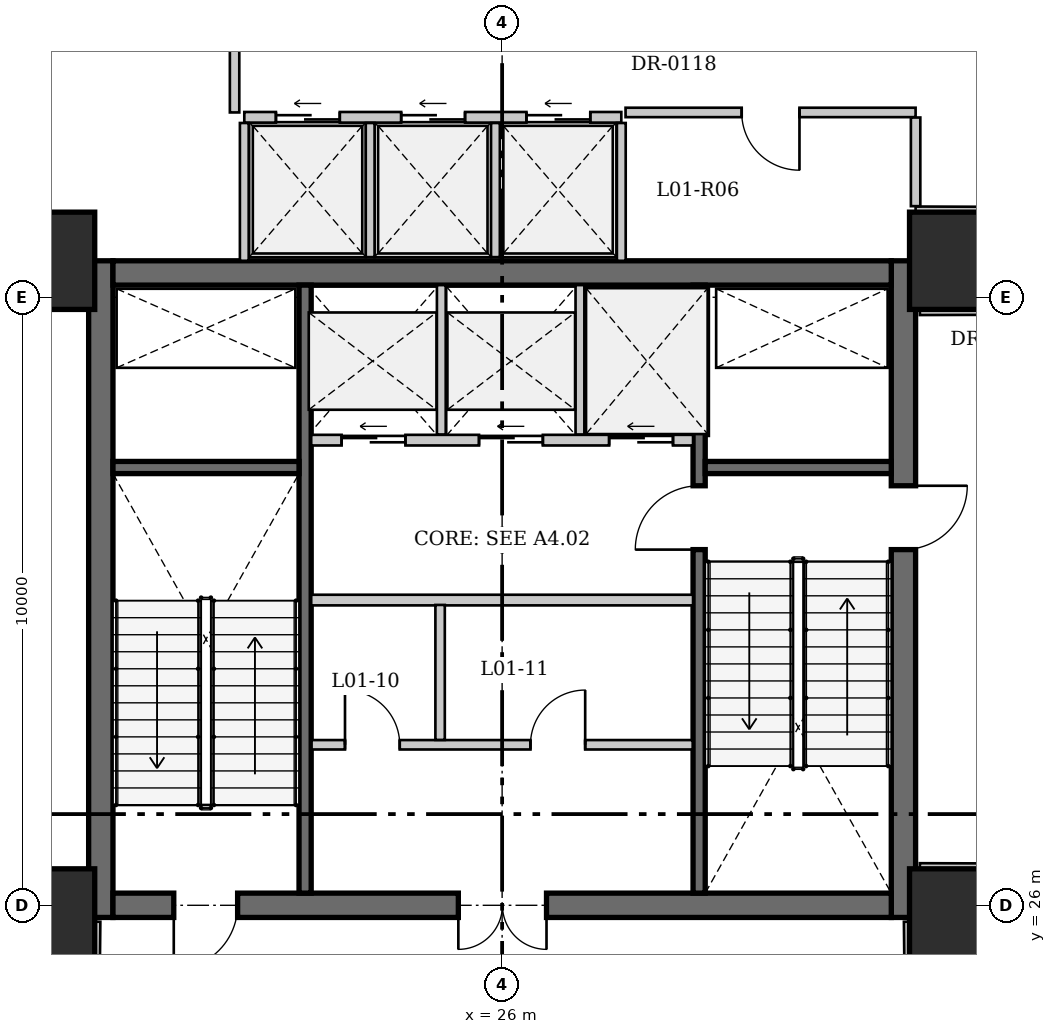
"""IFC4 building model, lengths in metres.
Left out: names, types, materials, properties, quantities, classifications, styles, units other than length and angle.
Written with IfcOpenShell. Run it as: python <this file> out.ifc"""

import sys

from ifc_helpers import new_model, si_unit, direction, frame, frame_2d, origin, origin_2d, place, context, subcontext, project, spatial, rectangle, extrude, source, transform, mapped, element, fill, save


model = new_model("IFC4")
c1 = context("Model", 3, precision=1e-05, world=origin(), true_north=direction((0.0, 1.0)))
c2 = subcontext(c1, "Body", "Model", "MODEL_VIEW")
j1 = project(units=[si_unit("LENGTHUNIT", "METRE"), si_unit("PLANEANGLEUNIT", "RADIAN")], contexts=[c1])
p1 = place(None, origin())
s1 = spatial("IfcSite", under=j1, at=p1, CompositionType="ELEMENT")
p2 = place(p1, origin())
s2 = spatial("IfcBuilding", under=s1, at=p2, CompositionType="ELEMENT")
p3 = place(p2, frame((0.0, 0.0, 5.2)))
s3 = spatial("IfcBuildingStorey", under=s2, at=p3, CompositionType="ELEMENT", Elevation=5.2)
for number, where, z_axis, x_axis in (
    (1, (18.5, 25.8, 0.0), (0.0, 0.0, 1.0), (1.0, 0.0, 0.0)),
    (2, (18.5, 36.6, 0.0), (0.0, 0.0, 1.0), (1.0, 0.0, 0.0)),
    (3, (33.5, 25.8, 0.0), (0.0, 0.0, 1.0), (1.0, 0.0, 0.0)),
    (4, (33.5, 36.6, 0.0), (0.0, 0.0, 1.0), (1.0, 0.0, 0.0)),
):
    element("IfcColumn", number, at=place(p3, frame(where, z_axis=z_axis, x_axis=x_axis)), inside=s3, PredefinedType="COLUMN", context=c2, shape_type="SweptSolid", body=[
        extrude(rectangle(XDim=1.6, YDim=1.6, at=origin_2d()), origin(), (0.0, 0.0, 1.0), 4.3),
    ])
p4 = place(p3, frame((19.4, 25.8, 0.0), z_axis=(0.0, 0.0, 1.0), x_axis=(0.0, 1.0, 0.0)))
e5 = element("IfcWall", 5, at=p4, inside=s3, PredefinedType="SHEAR", context=c2, shape_type="SweptSolid", body=[
    extrude(rectangle(XDim=10.8, YDim=0.4, at=frame_2d((5.4, 0.0))), origin(), (0.0, 0.0, 1.0), 4.6),
])
p5 = place(p3, frame((32.6, 36.6, 0.0), z_axis=(0.0, 0.0, 1.0), x_axis=(0.0, -1.0, 0.0)))
e6 = element("IfcWall", 6, at=p5, inside=s3, PredefinedType="SHEAR", context=c2, shape_type="SweptSolid", body=[
    extrude(rectangle(XDim=10.8, YDim=0.4, at=frame_2d((5.4, 0.0))), origin(), (0.0, 0.0, 1.0), 4.6),
])
p6 = place(p5, frame((3.7, 0.0, 0.0)))
e7 = element("IfcOpeningElement", 7, at=p6, cuts=e6, PredefinedType="OPENING", context=c2, shape_type="SweptSolid", body=[
    extrude(rectangle(XDim=1.05, YDim=2.15, at=frame_2d((0.525, 1.075))), frame((0.0, 0.21, 0.0), z_axis=(0.0, -1.0, 0.0), x_axis=(1.0, 0.0, 0.0)), (0.0, 0.0, 1.0), 0.42),
])
p7 = place(p3, frame((19.6, 36.4, 0.0), z_axis=(0.0, 0.0, 1.0), x_axis=(1.0, 0.0, 0.0)))
e8 = element("IfcWall", 8, at=p7, inside=s3, PredefinedType="SHEAR", context=c2, shape_type="SweptSolid", body=[
    extrude(rectangle(XDim=12.8, YDim=0.4, at=frame_2d((6.4, 0.0))), origin(), (0.0, 0.0, 1.0), 4.6),
])
p8 = place(p3, frame((32.4, 26.0, 0.0), z_axis=(0.0, 0.0, 1.0), x_axis=(-1.0, 0.0, 0.0)))
e9 = element("IfcWall", 9, at=p8, inside=s3, PredefinedType="SHEAR", context=c2, shape_type="SweptSolid", body=[
    extrude(rectangle(XDim=12.8, YDim=0.4, at=frame_2d((6.4, 0.0))), origin(), (0.0, 0.0, 1.0), 4.6),
])
p9 = place(p8, frame((10.75, 0.0, 0.0)))
e10 = element("IfcOpeningElement", 10, at=p9, cuts=e9, PredefinedType="OPENING", context=c2, shape_type="SweptSolid", body=[
    extrude(rectangle(XDim=1.05, YDim=2.15, at=frame_2d((0.525, 1.075))), frame((0.0, 0.21, 0.0), z_axis=(0.0, -1.0, 0.0), x_axis=(1.0, 0.0, 0.0)), (0.0, 0.0, 1.0), 0.42),
])
p10 = place(p8, frame((5.67, 0.0, 0.0)))
e11 = element("IfcOpeningElement", 11, at=p10, cuts=e9, PredefinedType="OPENING", context=c2, shape_type="SweptSolid", body=[
    extrude(rectangle(XDim=1.45, YDim=2.2, at=frame_2d((0.725, 1.1))), frame((0.0, 0.21, 0.0), z_axis=(0.0, -1.0, 0.0), x_axis=(1.0, 0.0, 0.0)), (0.0, 0.0, 1.0), 0.42),
])
p11 = place(p3, frame((22.76, 26.2, 0.0), z_axis=(0.0, 0.0, 1.0), x_axis=(0.0, 1.0, 0.0)))
e12 = element("IfcWall", 12, at=p11, inside=s3, PredefinedType="SHEAR", context=c2, shape_type="SweptSolid", body=[
    extrude(rectangle(XDim=10.0, YDim=0.2, at=frame_2d((5.0, 0.0))), origin(), (0.0, 0.0, 1.0), 4.6),
])
p12 = place(p3, frame((29.24, 26.2, 0.0), z_axis=(0.0, 0.0, 1.0), x_axis=(0.0, 1.0, 0.0)))
e13 = element("IfcWall", 13, at=p12, inside=s3, PredefinedType="SHEAR", context=c2, shape_type="SweptSolid", body=[
    extrude(rectangle(XDim=10.0, YDim=0.2, at=frame_2d((5.0, 0.0))), origin(), (0.0, 0.0, 1.0), 4.6),
])
p13 = place(p12, frame((5.65, 0.0, 0.0)))
e14 = element("IfcOpeningElement", 14, at=p13, cuts=e13, PredefinedType="OPENING", context=c2, shape_type="SweptSolid", body=[
    extrude(rectangle(XDim=1.05, YDim=2.15, at=frame_2d((0.525, 1.075))), frame((0.0, 0.11, 0.0), z_axis=(0.0, -1.0, 0.0), x_axis=(1.0, 0.0, 0.0)), (0.0, 0.0, 1.0), 0.22),
])
for number, where, z_axis, x_axis in (
    (15, (19.6, 33.2, 0.0), (0.0, 0.0, 1.0), (1.0, 0.0, 0.0)),
    (16, (29.34, 33.2, 0.0), (0.0, 0.0, 1.0), (1.0, 0.0, 0.0)),
):
    element("IfcWall", number, at=place(p3, frame(where, z_axis=z_axis, x_axis=x_axis)), inside=s3, PredefinedType="SHEAR", context=c2, shape_type="SweptSolid", body=[
        extrude(rectangle(XDim=3.06, YDim=0.2, at=frame_2d((1.53, 0.0))), origin(), (0.0, 0.0, 1.0), 4.6),
    ])
p14 = place(p3, frame((22.86, 33.65, 0.0), z_axis=(0.0, 0.0, 1.0), x_axis=(1.0, 0.0, 0.0)))
e17 = element("IfcWall", 17, at=p14, inside=s3, PredefinedType="SOLIDWALL", context=c2, shape_type="SweptSolid", body=[
    extrude(rectangle(XDim=6.28, YDim=0.175, at=frame_2d((3.14, 0.0))), origin(), (0.0, 0.0, 1.0), 4.3),
])
p15 = place(p14, frame((0.5, 0.0, 0.0)))
e18 = element("IfcOpeningElement", 18, at=p15, cuts=e17, PredefinedType="OPENING", context=c2, shape_type="SweptSolid", body=[
    extrude(rectangle(XDim=1.05, YDim=2.15, at=frame_2d((0.525, 1.075))), frame((0.0, 0.098, 0.0), z_axis=(0.0, -1.0, 0.0), x_axis=(1.0, 0.0, 0.0)), (0.0, 0.0, 1.0), 0.195),
])
p16 = place(p14, frame((2.76, 0.0, 0.0)))
e19 = element("IfcOpeningElement", 19, at=p16, cuts=e17, PredefinedType="OPENING", context=c2, shape_type="SweptSolid", body=[
    extrude(rectangle(XDim=1.05, YDim=2.15, at=frame_2d((0.525, 1.075))), frame((0.0, 0.098, 0.0), z_axis=(0.0, -1.0, 0.0), x_axis=(1.0, 0.0, 0.0)), (0.0, 0.0, 1.0), 0.195),
])
p17 = place(p14, frame((4.9, 0.0, 0.0)))
e20 = element("IfcOpeningElement", 20, at=p17, cuts=e17, PredefinedType="OPENING", context=c2, shape_type="SweptSolid", body=[
    extrude(rectangle(XDim=1.05, YDim=2.15, at=frame_2d((0.525, 1.075))), frame((0.0, 0.098, 0.0), z_axis=(0.0, -1.0, 0.0), x_axis=(1.0, 0.0, 0.0)), (0.0, 0.0, 1.0), 0.195),
])
for number, where, z_axis, x_axis in (
    (21, (25.0, 33.743, 0.0), (0.0, 0.0, 1.0), (0.0, 1.0, 0.0)),
    (22, (27.28, 33.743, 0.0), (0.0, 0.0, 1.0), (0.0, 1.0, 0.0)),
):
    element("IfcWall", number, at=place(p3, frame(where, z_axis=z_axis, x_axis=x_axis)), inside=s3, PredefinedType="SOLIDWALL", context=c2, shape_type="SweptSolid", body=[
        extrude(rectangle(XDim=2.457, YDim=0.145, at=frame_2d((1.228, 0.0))), origin(), (0.0, 0.0, 1.0), 4.3),
    ])
p18 = place(p3, frame((22.86, 31.02, 0.0), z_axis=(0.0, 0.0, 1.0), x_axis=(1.0, 0.0, 0.0)))
e23 = element("IfcWall", 23, at=p18, inside=s3, PredefinedType="SOLIDWALL", context=c2, shape_type="SweptSolid", body=[
    extrude(rectangle(XDim=6.28, YDim=0.175, at=frame_2d((3.14, 0.0))), origin(), (0.0, 0.0, 1.0), 4.3),
])
p19 = place(p3, frame((22.866, 28.64, 0.0), z_axis=(0.0, 0.0, 1.0), x_axis=(1.0, 0.0, 0.0)))
e24 = element("IfcWall", 24, at=p19, inside=s3, PredefinedType="PARTITIONING", context=c2, shape_type="SweptSolid", body=[
    extrude(rectangle(XDim=6.268, YDim=0.155, at=frame_2d((3.134, 0.0))), origin(), (0.0, 0.0, 1.0), 4.3),
])
p20 = place(p19, frame((0.55, 0.0, 0.0)))
e25 = element("IfcOpeningElement", 25, at=p20, cuts=e24, PredefinedType="OPENING", context=c2, shape_type="SweptSolid", body=[
    extrude(rectangle(XDim=0.9, YDim=2.1, at=frame_2d((0.45, 1.05))), frame((0.0, 0.087, 0.0), z_axis=(0.0, -1.0, 0.0), x_axis=(1.0, 0.0, 0.0)), (0.0, 0.0, 1.0), 0.175),
])
p21 = place(p19, frame((3.6, 0.0, 0.0)))
e26 = element("IfcOpeningElement", 26, at=p21, cuts=e24, PredefinedType="OPENING", context=c2, shape_type="SweptSolid", body=[
    extrude(rectangle(XDim=0.9, YDim=2.1, at=frame_2d((0.45, 1.05))), frame((0.0, 0.087, 0.0), z_axis=(0.0, -1.0, 0.0), x_axis=(1.0, 0.0, 0.0)), (0.0, 0.0, 1.0), 0.175),
])
p22 = place(p3, frame((24.98, 28.72, 0.0), z_axis=(0.0, 0.0, 1.0), x_axis=(0.0, 1.0, 0.0)))
e27 = element("IfcWall", 27, at=p22, inside=s3, PredefinedType="PARTITIONING", context=c2, shape_type="SweptSolid", body=[
    extrude(rectangle(XDim=2.22, YDim=0.155, at=frame_2d((1.11, 0.0))), origin(), (0.0, 0.0, 1.0), 4.3),
])
p23 = place(p3, frame((21.76, 38.96, 0.0), z_axis=(0.0, 0.0, 1.0), x_axis=(1.0, 0.0, 0.0)))
e28 = element("IfcWall", 28, at=p23, inside=s3, PredefinedType="SOLIDWALL", context=c2, shape_type="SweptSolid", body=[
    extrude(rectangle(XDim=6.2, YDim=0.175, at=frame_2d((3.1, 0.0))), origin(), (0.0, 0.0, 1.0), 4.3),
])
p24 = place(p23, frame((0.52, 0.0, 0.0)))
e29 = element("IfcOpeningElement", 29, at=p24, cuts=e28, PredefinedType="OPENING", context=c2, shape_type="SweptSolid", body=[
    extrude(rectangle(XDim=1.05, YDim=2.15, at=frame_2d((0.525, 1.075))), frame((0.0, 0.098, 0.0), z_axis=(0.0, -1.0, 0.0), x_axis=(1.0, 0.0, 0.0)), (0.0, 0.0, 1.0), 0.195),
])
p25 = place(p23, frame((2.58, 0.0, 0.0)))
e30 = element("IfcOpeningElement", 30, at=p25, cuts=e28, PredefinedType="OPENING", context=c2, shape_type="SweptSolid", body=[
    extrude(rectangle(XDim=1.05, YDim=2.15, at=frame_2d((0.525, 1.075))), frame((0.0, 0.098, 0.0), z_axis=(0.0, -1.0, 0.0), x_axis=(1.0, 0.0, 0.0)), (0.0, 0.0, 1.0), 0.195),
])
p26 = place(p23, frame((4.64, 0.0, 0.0)))
e31 = element("IfcOpeningElement", 31, at=p26, cuts=e28, PredefinedType="OPENING", context=c2, shape_type="SweptSolid", body=[
    extrude(rectangle(XDim=1.05, YDim=2.15, at=frame_2d((0.525, 1.075))), frame((0.0, 0.098, 0.0), z_axis=(0.0, -1.0, 0.0), x_axis=(1.0, 0.0, 0.0)), (0.0, 0.0, 1.0), 0.195),
])
for number, where, z_axis, x_axis in (
    (32, (21.76, 36.6, 0.0), (0.0, 0.0, 1.0), (0.0, 1.0, 0.0)),
    (33, (27.96, 36.6, 0.0), (0.0, 0.0, 1.0), (0.0, 1.0, 0.0)),
):
    element("IfcWall", number, at=place(p3, frame(where, z_axis=z_axis, x_axis=x_axis)), inside=s3, PredefinedType="SOLIDWALL", context=c2, shape_type="SweptSolid", body=[
        extrude(rectangle(XDim=2.266, YDim=0.145, at=frame_2d((1.133, 0.0))), origin(), (0.0, 0.0, 1.0), 4.3),
    ])
for number, where, z_axis, x_axis in (
    (34, (23.83, 36.66, 0.0), (0.0, 0.0, 1.0), (0.0, 1.0, 0.0)),
    (35, (25.89, 36.66, 0.0), (0.0, 0.0, 1.0), (0.0, 1.0, 0.0)),
):
    element("IfcWall", number, at=place(p3, frame(where, z_axis=z_axis, x_axis=x_axis)), inside=s3, PredefinedType="SOLIDWALL", context=c2, shape_type="SweptSolid", body=[
        extrude(rectangle(XDim=2.207, YDim=0.145, at=frame_2d((1.103, 0.0))), origin(), (0.0, 0.0, 1.0), 4.3),
    ])
p27 = place(p3, frame((32.8, 39.04, 0.0), z_axis=(0.0, 0.0, 1.0), x_axis=(-1.0, 0.0, 0.0)))
e36 = element("IfcWall", 36, at=p27, inside=s3, PredefinedType="PARTITIONING", context=c2, shape_type="SweptSolid", body=[
    extrude(rectangle(XDim=4.77, YDim=0.155, at=frame_2d((2.385, 0.0))), origin(), (0.0, 0.0, 1.0), 4.3),
])
p28 = place(p27, frame((1.91, 0.0, 0.0)))
e37 = element("IfcOpeningElement", 37, at=p28, cuts=e36, PredefinedType="OPENING", context=c2, shape_type="SweptSolid", body=[
    extrude(rectangle(XDim=0.95, YDim=2.15, at=frame_2d((0.475, 1.075))), frame((0.0, 0.087, 0.0), z_axis=(0.0, -1.0, 0.0), x_axis=(1.0, 0.0, 0.0)), (0.0, 0.0, 1.0), 0.175),
])
p29 = place(p3, frame((19.308, 25.07, 0.0), z_axis=(0.0, 0.0, 1.0), x_axis=(0.010362137944, 0.999946311607, 0.0)))
e38 = element("IfcWall", 38, at=p29, inside=s3, PredefinedType="PARTITIONING", context=c2, shape_type="SweptSolid", body=[
    extrude(rectangle(XDim=0.66, YDim=0.155, at=frame_2d((0.33, 0.0))), origin(), (0.0, 0.0, 1.0), 4.3),
])
p30 = place(p3, frame((32.685, 25.73, 0.0), z_axis=(0.0, 0.0, 1.0), x_axis=(0.010511902743, -0.999944748424, 0.0)))
e39 = element("IfcWall", 39, at=p30, inside=s3, PredefinedType="PARTITIONING", context=c2, shape_type="SweptSolid", body=[
    extrude(rectangle(XDim=0.743, YDim=0.155, at=frame_2d((0.372, 0.0))), origin(), (0.0, 0.0, 1.0), 4.3),
])
p31 = place(p3, frame((34.227, 26.611, 0.0), z_axis=(0.0, 0.0, 1.0), x_axis=(-0.999995856473, 0.002878721429, 0.0)))
e40 = element("IfcWall", 40, at=p31, inside=s3, PredefinedType="PARTITIONING", context=c2, shape_type="SweptSolid", body=[
    extrude(rectangle(XDim=1.357, YDim=0.155, at=frame_2d((0.678, 0.0))), origin(), (0.0, 0.0, 1.0), 4.3),
])
p32 = place(p3, frame((32.87, 35.785, 0.0), z_axis=(0.0, 0.0, 1.0), x_axis=(0.99999584892, 0.002881343971, 0.0)))
e41 = element("IfcWall", 41, at=p32, inside=s3, PredefinedType="PARTITIONING", context=c2, shape_type="SweptSolid", body=[
    extrude(rectangle(XDim=1.44, YDim=0.155, at=frame_2d((0.72, 0.0))), origin(), (0.0, 0.0, 1.0), 4.3),
])
p33 = place(p3, frame((34.228, 37.41, 0.0), z_axis=(0.0, 0.0, 1.0), x_axis=(-0.999993554729, 0.003590334185, 0.0)))
e42 = element("IfcWall", 42, at=p33, inside=s3, PredefinedType="PARTITIONING", context=c2, shape_type="SweptSolid", body=[
    extrude(rectangle(XDim=1.428, YDim=0.155, at=frame_2d((0.714, 0.0))), origin(), (0.0, 0.0, 1.0), 4.3),
])
p34 = place(p3, frame((32.8, 37.499, 0.0), z_axis=(0.0, 0.0, 1.0), x_axis=(0.0, 1.0, 0.0)))
e43 = element("IfcWall", 43, at=p34, inside=s3, PredefinedType="PARTITIONING", context=c2, shape_type="SweptSolid", body=[
    extrude(rectangle(XDim=1.458, YDim=0.155, at=frame_2d((0.729, 0.0))), origin(), (0.0, 0.0, 1.0), 4.3),
])
p35 = place(p3, frame((21.6, 39.04, 0.0), z_axis=(0.0, 0.0, 1.0), x_axis=(0.0, 1.0, 0.0)))
e44 = element("IfcWall", 44, at=p35, inside=s3, PredefinedType="PARTITIONING", context=c2, shape_type="SweptSolid", body=[
    extrude(rectangle(XDim=1.876, YDim=0.155, at=frame_2d((0.938, 0.0))), origin(), (0.0, 0.0, 1.0), 4.3),
])
m1 = source(origin(), c2, "Body", "SweptSolid", [
    extrude(rectangle(XDim=1.05, YDim=2.15, at=frame_2d((0.525, 1.075))), frame((0.0, 0.025, 0.0), z_axis=(0.0, -1.0, 0.0), x_axis=(1.0, 0.0, 0.0)), (0.0, 0.0, 1.0), 0.05),
])
p36 = place(p9, origin())
e45 = element("IfcDoor", 45, at=p36, inside=s3, OperationType="SINGLE_SWING_RIGHT", PredefinedType="DOOR", context=c2, shape_type="MappedRepresentation", body=[
    mapped(m1, transform((0.0, 0.0, 0.0), x_axis=(1.0, 0.0, 0.0), y_axis=(0.0, 1.0, 0.0), z_axis=(0.0, 0.0, 1.0), scale=1.0)),
])
fill(e10, e45)
m2 = source(origin(), c2, "Body", "SweptSolid", [
    extrude(rectangle(XDim=1.45, YDim=2.2, at=frame_2d((0.725, 1.1))), frame((0.0, 0.025, 0.0), z_axis=(0.0, -1.0, 0.0), x_axis=(1.0, 0.0, 0.0)), (0.0, 0.0, 1.0), 0.05),
])
p37 = place(p10, origin())
e46 = element("IfcDoor", 46, at=p37, inside=s3, OperationType="DOUBLE_DOOR_SINGLE_SWING", PredefinedType="DOOR", context=c2, shape_type="MappedRepresentation", body=[
    mapped(m2, transform((0.0, 0.0, 0.0), x_axis=(1.0, 0.0, 0.0), y_axis=(0.0, 1.0, 0.0), z_axis=(0.0, 0.0, 1.0), scale=1.0)),
])
fill(e11, e46)
p38 = place(p6, origin())
e47 = element("IfcDoor", 47, at=p38, inside=s3, OperationType="SINGLE_SWING_LEFT", PredefinedType="DOOR", context=c2, shape_type="MappedRepresentation", body=[
    mapped(m1, transform((0.0, 0.0, 0.0), x_axis=(1.0, 0.0, 0.0), y_axis=(0.0, 1.0, 0.0), z_axis=(0.0, 0.0, 1.0), scale=1.0)),
])
fill(e7, e47)
p39 = place(p13, origin())
e48 = element("IfcDoor", 48, at=p39, inside=s3, OperationType="SINGLE_SWING_LEFT", PredefinedType="DOOR", context=c2, shape_type="MappedRepresentation", body=[
    mapped(m1, transform((0.0, 0.0, 0.0), x_axis=(1.0, 0.0, 0.0), y_axis=(0.0, 1.0, 0.0), z_axis=(0.0, 0.0, 1.0), scale=1.0)),
])
fill(e14, e48)
m3 = source(origin(), c2, "Body", "SweptSolid", [
    extrude(rectangle(XDim=1.05, YDim=2.15, at=frame_2d((0.525, 1.075))), frame((0.0, 0.025, 0.0), z_axis=(0.0, -1.0, 0.0), x_axis=(1.0, 0.0, 0.0)), (0.0, 0.0, 1.0), 0.05),
])
p40 = place(p15, origin())
e49 = element("IfcDoor", 49, at=p40, inside=s3, OperationType="SLIDING_TO_LEFT", PredefinedType="DOOR", context=c2, shape_type="MappedRepresentation", body=[
    mapped(m3, transform((0.0, 0.0, 0.0), x_axis=(1.0, 0.0, 0.0), y_axis=(0.0, 1.0, 0.0), z_axis=(0.0, 0.0, 1.0), scale=1.0)),
])
fill(e18, e49)
p41 = place(p16, origin())
e50 = element("IfcDoor", 50, at=p41, inside=s3, OperationType="SLIDING_TO_LEFT", PredefinedType="DOOR", context=c2, shape_type="MappedRepresentation", body=[
    mapped(m3, transform((0.0, 0.0, 0.0), x_axis=(1.0, 0.0, 0.0), y_axis=(0.0, 1.0, 0.0), z_axis=(0.0, 0.0, 1.0), scale=1.0)),
])
fill(e19, e50)
p42 = place(p17, origin())
e51 = element("IfcDoor", 51, at=p42, inside=s3, OperationType="SLIDING_TO_LEFT", PredefinedType="DOOR", context=c2, shape_type="MappedRepresentation", body=[
    mapped(m3, transform((0.0, 0.0, 0.0), x_axis=(1.0, 0.0, 0.0), y_axis=(0.0, 1.0, 0.0), z_axis=(0.0, 0.0, 1.0), scale=1.0)),
])
fill(e20, e51)
m4 = source(origin(), c2, "Body", "SweptSolid", [
    extrude(rectangle(XDim=0.9, YDim=2.1, at=frame_2d((0.45, 1.05))), frame((0.0, 0.025, 0.0), z_axis=(0.0, -1.0, 0.0), x_axis=(1.0, 0.0, 0.0)), (0.0, 0.0, 1.0), 0.05),
])
p43 = place(p20, origin())
e52 = element("IfcDoor", 52, at=p43, inside=s3, OperationType="SINGLE_SWING_LEFT", PredefinedType="DOOR", context=c2, shape_type="MappedRepresentation", body=[
    mapped(m4, transform((0.0, 0.0, 0.0), x_axis=(1.0, 0.0, 0.0), y_axis=(0.0, 1.0, 0.0), z_axis=(0.0, 0.0, 1.0), scale=1.0)),
])
fill(e25, e52)
p44 = place(p21, origin())
e53 = element("IfcDoor", 53, at=p44, inside=s3, OperationType="SINGLE_SWING_RIGHT", PredefinedType="DOOR", context=c2, shape_type="MappedRepresentation", body=[
    mapped(m4, transform((0.0, 0.0, 0.0), x_axis=(1.0, 0.0, 0.0), y_axis=(0.0, 1.0, 0.0), z_axis=(0.0, 0.0, 1.0), scale=1.0)),
])
fill(e26, e53)
p45 = place(p24, origin())
e54 = element("IfcDoor", 54, at=p45, inside=s3, OperationType="SLIDING_TO_LEFT", PredefinedType="DOOR", context=c2, shape_type="MappedRepresentation", body=[
    mapped(m3, transform((0.0, 0.0, 0.0), x_axis=(1.0, 0.0, 0.0), y_axis=(0.0, 1.0, 0.0), z_axis=(0.0, 0.0, 1.0), scale=1.0)),
])
fill(e29, e54)
p46 = place(p25, origin())
e55 = element("IfcDoor", 55, at=p46, inside=s3, OperationType="SLIDING_TO_LEFT", PredefinedType="DOOR", context=c2, shape_type="MappedRepresentation", body=[
    mapped(m3, transform((0.0, 0.0, 0.0), x_axis=(1.0, 0.0, 0.0), y_axis=(0.0, 1.0, 0.0), z_axis=(0.0, 0.0, 1.0), scale=1.0)),
])
fill(e30, e55)
p47 = place(p26, origin())
e56 = element("IfcDoor", 56, at=p47, inside=s3, OperationType="SLIDING_TO_LEFT", PredefinedType="DOOR", context=c2, shape_type="MappedRepresentation", body=[
    mapped(m3, transform((0.0, 0.0, 0.0), x_axis=(1.0, 0.0, 0.0), y_axis=(0.0, 1.0, 0.0), z_axis=(0.0, 0.0, 1.0), scale=1.0)),
])
fill(e31, e56)
m5 = source(origin(), c2, "Body", "SweptSolid", [
    extrude(rectangle(XDim=0.95, YDim=2.15, at=frame_2d((0.475, 1.075))), frame((0.0, 0.025, 0.0), z_axis=(0.0, -1.0, 0.0), x_axis=(1.0, 0.0, 0.0)), (0.0, 0.0, 1.0), 0.05),
])
p48 = place(p28, origin())
e57 = element("IfcDoor", 57, at=p48, inside=s3, OperationType="SINGLE_SWING_LEFT", PredefinedType="DOOR", context=c2, shape_type="MappedRepresentation", body=[
    mapped(m5, transform((0.0, 0.0, 0.0), x_axis=(1.0, 0.0, 0.0), y_axis=(0.0, 1.0, 0.0), z_axis=(0.0, 0.0, 1.0), scale=1.0)),
])
fill(e37, e57)
save(model, sys.argv[1])
